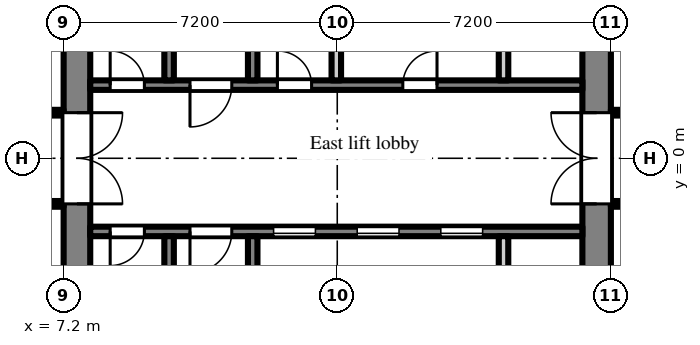
"""IFC4 building model, lengths in metres.
Left out: names, types, materials, properties, quantities, classifications, styles, units other than length and angle.
Written with IfcOpenShell. Run it as: python <this file> out.ifc"""

import sys

from ifc_helpers import new_model, si_unit, direction, frame, frame_2d, origin, place, context, subcontext, project, spatial, rectangle, extrude, element, fill, save


model = new_model("IFC4")
c1 = context("Model", 3, precision=1e-05, world=origin(), true_north=direction((0.0, 1.0)))
c2 = subcontext(c1, "Body", "Model", "MODEL_VIEW")
j1 = project(units=[si_unit("LENGTHUNIT", "METRE"), si_unit("PLANEANGLEUNIT", "RADIAN")], contexts=[c1])
p1 = place(None, origin())
s1 = spatial("IfcSite", under=j1, at=p1, CompositionType="ELEMENT")
p2 = place(p1, origin())
s2 = spatial("IfcBuilding", under=s1, at=p2, CompositionType="ELEMENT")
p3 = place(p2, frame((0.0, 0.0, 75.9)))
s3 = spatial("IfcBuildingStorey", under=s2, at=p3, CompositionType="ELEMENT", Elevation=75.9)
p4 = place(p3, frame((7.55, -7.2, 0.0), z_axis=(0.0, 0.0, 1.0), x_axis=(0.0, 1.0, 0.0)))
e1 = element("IfcWall", 1, at=p4, inside=s3, PredefinedType="SHEAR", context=c2, shape_type="SweptSolid", body=[
    extrude(rectangle(XDim=14.4, YDim=0.7, at=frame_2d((7.2, 0.0))), origin(), (0.0, 0.0, 1.0), 2.575),
])
p5 = place(p4, frame((6.0, 0.0, 0.0)))
e2 = element("IfcOpeningElement", 2, at=p5, cuts=e1, PredefinedType="OPENING", context=c2, shape_type="SweptSolid", body=[
    extrude(rectangle(XDim=2.4, YDim=2.2, at=frame_2d((1.2, 1.1))), frame((0.0, 0.36, 0.0), z_axis=(0.0, -1.0, 0.0), x_axis=(1.0, 0.0, 0.0)), (0.0, 0.0, 1.0), 0.72),
])
p6 = place(p3, frame((21.225, -7.2, 0.0), z_axis=(0.0, 0.0, 1.0), x_axis=(0.0, 1.0, 0.0)))
e3 = element("IfcWall", 3, at=p6, inside=s3, PredefinedType="SHEAR", context=c2, shape_type="SweptSolid", body=[
    extrude(rectangle(XDim=14.4, YDim=0.75, at=frame_2d((7.2, 0.0))), origin(), (0.0, 0.0, 1.0), 2.575),
])
p7 = place(p6, frame((6.0, 0.0, 0.0)))
e4 = element("IfcOpeningElement", 4, at=p7, cuts=e3, PredefinedType="OPENING", context=c2, shape_type="SweptSolid", body=[
    extrude(rectangle(XDim=2.4, YDim=2.2, at=frame_2d((1.2, 1.1))), frame((0.0, 0.385, 0.0), z_axis=(0.0, -1.0, 0.0), x_axis=(1.0, 0.0, 0.0)), (0.0, 0.0, 1.0), 0.77),
])
p8 = place(p3, frame((7.9, 1.925, 0.0), z_axis=(0.0, 0.0, 1.0), x_axis=(1.0, 0.0, 0.0)))
e5 = element("IfcWall", 5, at=p8, inside=s3, PredefinedType="SHEAR", context=c2, shape_type="SweptSolid", body=[
    extrude(rectangle(XDim=12.95, YDim=0.25, at=frame_2d((6.475, 0.0))), origin(), (0.0, 0.0, 1.0), 2.575),
])
p9 = place(p8, frame((0.525, 0.0, 0.0)))
e6 = element("IfcOpeningElement", 6, at=p9, cuts=e5, PredefinedType="OPENING", context=c2, shape_type="SweptSolid", body=[
    extrude(rectangle(XDim=0.9, YDim=2.1, at=frame_2d((0.45, 1.05))), frame((0.0, 0.135, 0.0), z_axis=(0.0, -1.0, 0.0), x_axis=(1.0, 0.0, 0.0)), (0.0, 0.0, 1.0), 0.27),
])
p10 = place(p8, frame((2.625, 0.0, 0.0)))
e7 = element("IfcOpeningElement", 7, at=p10, cuts=e5, PredefinedType="OPENING", context=c2, shape_type="SweptSolid", body=[
    extrude(rectangle(XDim=1.1, YDim=2.1, at=frame_2d((0.55, 1.05))), frame((0.0, 0.135, 0.0), z_axis=(0.0, -1.0, 0.0), x_axis=(1.0, 0.0, 0.0)), (0.0, 0.0, 1.0), 0.27),
])
p11 = place(p8, frame((4.925, 0.0, 0.0)))
e8 = element("IfcOpeningElement", 8, at=p11, cuts=e5, PredefinedType="OPENING", context=c2, shape_type="SweptSolid", body=[
    extrude(rectangle(XDim=0.9, YDim=2.1, at=frame_2d((0.45, 1.05))), frame((0.0, 0.135, 0.0), z_axis=(0.0, -1.0, 0.0), x_axis=(1.0, 0.0, 0.0)), (0.0, 0.0, 1.0), 0.27),
])
p12 = place(p8, frame((8.225, 0.0, 0.0)))
e9 = element("IfcOpeningElement", 9, at=p12, cuts=e5, PredefinedType="OPENING", context=c2, shape_type="SweptSolid", body=[
    extrude(rectangle(XDim=0.9, YDim=2.1, at=frame_2d((0.45, 1.05))), frame((0.0, 0.135, 0.0), z_axis=(0.0, -1.0, 0.0), x_axis=(1.0, 0.0, 0.0)), (0.0, 0.0, 1.0), 0.27),
])
p13 = place(p3, frame((9.975, 2.05, 0.0), z_axis=(0.0, 0.0, 1.0), x_axis=(0.0, 1.0, 0.0)))
e10 = element("IfcWall", 10, at=p13, inside=s3, PredefinedType="SHEAR", context=c2, shape_type="SweptSolid", body=[
    extrude(rectangle(XDim=4.65, YDim=0.25, at=frame_2d((2.325, 0.0))), origin(), (0.0, 0.0, 1.0), 2.575),
])
p14 = place(p13, frame((2.95, 0.0, 0.0)))
e11 = element("IfcOpeningElement", 11, at=p14, cuts=e10, PredefinedType="OPENING", context=c2, shape_type="SweptSolid", body=[
    extrude(rectangle(XDim=1.1, YDim=2.1, at=frame_2d((0.55, 1.05))), frame((0.0, 0.135, 0.0), z_axis=(0.0, -1.0, 0.0), x_axis=(1.0, 0.0, 0.0)), (0.0, 0.0, 1.0), 0.27),
])
p15 = place(p3, frame((12.175, 2.05, 0.0), z_axis=(0.0, 0.0, 1.0), x_axis=(0.0, 1.0, 0.0)))
e12 = element("IfcWall", 12, at=p15, inside=s3, PredefinedType="SHEAR", context=c2, shape_type="SweptSolid", body=[
    extrude(rectangle(XDim=4.65, YDim=0.25, at=frame_2d((2.325, 0.0))), origin(), (0.0, 0.0, 1.0), 2.575),
])
p16 = place(p15, frame((2.95, 0.0, 0.0)))
e13 = element("IfcOpeningElement", 13, at=p16, cuts=e12, PredefinedType="OPENING", context=c2, shape_type="SweptSolid", body=[
    extrude(rectangle(XDim=1.1, YDim=2.1, at=frame_2d((0.55, 1.05))), frame((0.0, 0.135, 0.0), z_axis=(0.0, -1.0, 0.0), x_axis=(1.0, 0.0, 0.0)), (0.0, 0.0, 1.0), 0.27),
])
for number, where, z_axis, x_axis in (
    (14, (14.375, 2.05, 0.0), (0.0, 0.0, 1.0), (0.0, 1.0, 0.0)),
    (15, (18.775, 2.05, 0.0), (0.0, 0.0, 1.0), (0.0, 1.0, 0.0)),
):
    element("IfcWall", number, at=place(p3, frame(where, z_axis=z_axis, x_axis=x_axis)), inside=s3, PredefinedType="PARTITIONING", context=c2, shape_type="SweptSolid", body=[
        extrude(rectangle(XDim=2.1, YDim=0.25, at=frame_2d((1.05, 0.0))), origin(), (0.0, 0.0, 1.0), 2.575),
    ])
p17 = place(p3, frame((7.9, -1.925, 0.0), z_axis=(0.0, 0.0, 1.0), x_axis=(1.0, 0.0, 0.0)))
e16 = element("IfcWall", 16, at=p17, inside=s3, PredefinedType="SHEAR", context=c2, shape_type="SweptSolid", body=[
    extrude(rectangle(XDim=12.95, YDim=0.25, at=frame_2d((6.475, 0.0))), origin(), (0.0, 0.0, 1.0), 2.575),
])
p18 = place(p17, frame((4.825, 0.0, 0.0)))
e17 = element("IfcOpeningElement", 17, at=p18, cuts=e16, PredefinedType="OPENING", context=c2, shape_type="SweptSolid", body=[
    extrude(rectangle(XDim=1.1, YDim=2.1, at=frame_2d((0.55, 1.05))), frame((0.0, 0.135, 0.0), z_axis=(0.0, -1.0, 0.0), x_axis=(1.0, 0.0, 0.0)), (0.0, 0.0, 1.0), 0.27),
])
p19 = place(p17, frame((7.025, 0.0, 0.0)))
e18 = element("IfcOpeningElement", 18, at=p19, cuts=e16, PredefinedType="OPENING", context=c2, shape_type="SweptSolid", body=[
    extrude(rectangle(XDim=1.1, YDim=2.1, at=frame_2d((0.55, 1.05))), frame((0.0, 0.135, 0.0), z_axis=(0.0, -1.0, 0.0), x_axis=(1.0, 0.0, 0.0)), (0.0, 0.0, 1.0), 0.27),
])
p20 = place(p17, frame((9.225, 0.0, 0.0)))
e19 = element("IfcOpeningElement", 19, at=p20, cuts=e16, PredefinedType="OPENING", context=c2, shape_type="SweptSolid", body=[
    extrude(rectangle(XDim=1.1, YDim=2.1, at=frame_2d((0.55, 1.05))), frame((0.0, 0.135, 0.0), z_axis=(0.0, -1.0, 0.0), x_axis=(1.0, 0.0, 0.0)), (0.0, 0.0, 1.0), 0.27),
])
p21 = place(p17, frame((0.525, 0.0, 0.0)))
e20 = element("IfcOpeningElement", 20, at=p21, cuts=e16, PredefinedType="OPENING", context=c2, shape_type="SweptSolid", body=[
    extrude(rectangle(XDim=0.9, YDim=2.1, at=frame_2d((0.45, 1.05))), frame((0.0, 0.135, 0.0), z_axis=(0.0, -1.0, 0.0), x_axis=(1.0, 0.0, 0.0)), (0.0, 0.0, 1.0), 0.27),
])
p22 = place(p17, frame((2.625, 0.0, 0.0)))
e21 = element("IfcOpeningElement", 21, at=p22, cuts=e16, PredefinedType="OPENING", context=c2, shape_type="SweptSolid", body=[
    extrude(rectangle(XDim=1.1, YDim=2.1, at=frame_2d((0.55, 1.05))), frame((0.0, 0.135, 0.0), z_axis=(0.0, -1.0, 0.0), x_axis=(1.0, 0.0, 0.0)), (0.0, 0.0, 1.0), 0.27),
])
p23 = place(p3, frame((9.975, -2.05, 0.0), z_axis=(0.0, 0.0, 1.0), x_axis=(0.0, -1.0, 0.0)))
e22 = element("IfcWall", 22, at=p23, inside=s3, PredefinedType="SHEAR", context=c2, shape_type="SweptSolid", body=[
    extrude(rectangle(XDim=4.65, YDim=0.25, at=frame_2d((2.325, 0.0))), origin(), (0.0, 0.0, 1.0), 2.575),
])
p24 = place(p23, frame((2.95, 0.0, 0.0)))
e23 = element("IfcOpeningElement", 23, at=p24, cuts=e22, PredefinedType="OPENING", context=c2, shape_type="SweptSolid", body=[
    extrude(rectangle(XDim=1.1, YDim=2.1, at=frame_2d((0.55, 1.05))), frame((0.0, 0.135, 0.0), z_axis=(0.0, -1.0, 0.0), x_axis=(1.0, 0.0, 0.0)), (0.0, 0.0, 1.0), 0.27),
])
p25 = place(p3, frame((12.175, -2.05, 0.0), z_axis=(0.0, 0.0, 1.0), x_axis=(0.0, -1.0, 0.0)))
e24 = element("IfcWall", 24, at=p25, inside=s3, PredefinedType="SHEAR", context=c2, shape_type="SweptSolid", body=[
    extrude(rectangle(XDim=4.65, YDim=0.25, at=frame_2d((2.325, 0.0))), origin(), (0.0, 0.0, 1.0), 2.575),
])
p26 = place(p25, frame((2.95, 0.0, 0.0)))
e25 = element("IfcOpeningElement", 25, at=p26, cuts=e24, PredefinedType="OPENING", context=c2, shape_type="SweptSolid", body=[
    extrude(rectangle(XDim=1.1, YDim=2.1, at=frame_2d((0.55, 1.05))), frame((0.0, 0.135, 0.0), z_axis=(0.0, -1.0, 0.0), x_axis=(1.0, 0.0, 0.0)), (0.0, 0.0, 1.0), 0.27),
])
p27 = place(p3, frame((18.775, -2.05, 0.0), z_axis=(0.0, 0.0, 1.0), x_axis=(0.0, -1.0, 0.0)))
e26 = element("IfcWall", 26, at=p27, inside=s3, PredefinedType="PARTITIONING", context=c2, shape_type="SweptSolid", body=[
    extrude(rectangle(XDim=2.1, YDim=0.25, at=frame_2d((1.05, 0.0))), origin(), (0.0, 0.0, 1.0), 2.575),
])
p28 = place(p3, frame((1.275, -1.2, 0.0), z_axis=(0.0, 0.0, 1.0), x_axis=(1.0, 0.0, 0.0)))
e27 = element("IfcWall", 27, at=p28, inside=s3, PredefinedType="PARTITIONING", context=c2, shape_type="SweptSolid", body=[
    extrude(rectangle(XDim=5.925, YDim=0.15, at=frame_2d((2.962, 0.0))), origin(), (0.0, 0.0, 1.0), 2.575),
])
p29 = place(p28, frame((3.075, 0.0, 0.0)))
e28 = element("IfcOpeningElement", 28, at=p29, cuts=e27, PredefinedType="OPENING", context=c2, shape_type="SweptSolid", body=[
    extrude(rectangle(XDim=0.9, YDim=2.1, at=frame_2d((0.45, 1.05))), frame((0.0, 0.085, 0.0), z_axis=(0.0, -1.0, 0.0), x_axis=(1.0, 0.0, 0.0)), (0.0, 0.0, 1.0), 0.17),
])
p30 = place(p3, frame((1.275, 1.2, 0.0), z_axis=(0.0, 0.0, 1.0), x_axis=(1.0, 0.0, 0.0)))
e29 = element("IfcWall", 29, at=p30, inside=s3, PredefinedType="PARTITIONING", context=c2, shape_type="SweptSolid", body=[
    extrude(rectangle(XDim=5.925, YDim=0.15, at=frame_2d((2.962, 0.0))), origin(), (0.0, 0.0, 1.0), 2.575),
])
p31 = place(p30, frame((3.475, 0.0, 0.0)))
e30 = element("IfcOpeningElement", 30, at=p31, cuts=e29, PredefinedType="OPENING", context=c2, shape_type="SweptSolid", body=[
    extrude(rectangle(XDim=0.9, YDim=2.1, at=frame_2d((0.45, 1.05))), frame((0.0, 0.085, 0.0), z_axis=(0.0, -1.0, 0.0), x_axis=(1.0, 0.0, 0.0)), (0.0, 0.0, 1.0), 0.17),
])
p32 = place(p3, frame((21.6, -1.2, 0.0), z_axis=(0.0, 0.0, 1.0), x_axis=(1.0, 0.0, 0.0)))
e31 = element("IfcWall", 31, at=p32, inside=s3, PredefinedType="PARTITIONING", context=c2, shape_type="SweptSolid", body=[
    extrude(rectangle(XDim=14.9, YDim=0.15, at=frame_2d((7.45, 0.0))), origin(), (0.0, 0.0, 1.0), 2.575),
])
p33 = place(p32, frame((0.45, 0.0, 0.0)))
e32 = element("IfcOpeningElement", 32, at=p33, cuts=e31, PredefinedType="OPENING", context=c2, shape_type="SweptSolid", body=[
    extrude(rectangle(XDim=0.9, YDim=2.1, at=frame_2d((0.45, 1.05))), frame((0.0, 0.085, 0.0), z_axis=(0.0, -1.0, 0.0), x_axis=(1.0, 0.0, 0.0)), (0.0, 0.0, 1.0), 0.17),
])
p34 = place(p32, frame((2.25, 0.0, 0.0)))
e33 = element("IfcOpeningElement", 33, at=p34, cuts=e31, PredefinedType="OPENING", context=c2, shape_type="SweptSolid", body=[
    extrude(rectangle(XDim=0.9, YDim=2.1, at=frame_2d((0.45, 1.05))), frame((0.0, 0.085, 0.0), z_axis=(0.0, -1.0, 0.0), x_axis=(1.0, 0.0, 0.0)), (0.0, 0.0, 1.0), 0.17),
])
p35 = place(p32, frame((4.95, 0.0, 0.0)))
e34 = element("IfcOpeningElement", 34, at=p35, cuts=e31, PredefinedType="OPENING", context=c2, shape_type="SweptSolid", body=[
    extrude(rectangle(XDim=0.9, YDim=2.1, at=frame_2d((0.45, 1.05))), frame((0.0, 0.085, 0.0), z_axis=(0.0, -1.0, 0.0), x_axis=(1.0, 0.0, 0.0)), (0.0, 0.0, 1.0), 0.17),
])
p36 = place(p32, frame((7.65, 0.0, 0.0)))
e35 = element("IfcOpeningElement", 35, at=p36, cuts=e31, PredefinedType="OPENING", context=c2, shape_type="SweptSolid", body=[
    extrude(rectangle(XDim=0.9, YDim=2.1, at=frame_2d((0.45, 1.05))), frame((0.0, 0.085, 0.0), z_axis=(0.0, -1.0, 0.0), x_axis=(1.0, 0.0, 0.0)), (0.0, 0.0, 1.0), 0.17),
])
p37 = place(p32, frame((9.45, 0.0, 0.0)))
e36 = element("IfcOpeningElement", 36, at=p37, cuts=e31, PredefinedType="OPENING", context=c2, shape_type="SweptSolid", body=[
    extrude(rectangle(XDim=0.9, YDim=2.1, at=frame_2d((0.45, 1.05))), frame((0.0, 0.085, 0.0), z_axis=(0.0, -1.0, 0.0), x_axis=(1.0, 0.0, 0.0)), (0.0, 0.0, 1.0), 0.17),
])
p38 = place(p32, frame((11.95, 0.0, 0.0)))
e37 = element("IfcOpeningElement", 37, at=p38, cuts=e31, PredefinedType="OPENING", context=c2, shape_type="SweptSolid", body=[
    extrude(rectangle(XDim=1.8, YDim=2.1, at=frame_2d((0.9, 1.05))), frame((0.0, 0.085, 0.0), z_axis=(0.0, -1.0, 0.0), x_axis=(1.0, 0.0, 0.0)), (0.0, 0.0, 1.0), 0.17),
])
p39 = place(p3, frame((21.6, 1.2, 0.0), z_axis=(0.0, 0.0, 1.0), x_axis=(1.0, 0.0, 0.0)))
e38 = element("IfcWall", 38, at=p39, inside=s3, PredefinedType="PARTITIONING", context=c2, shape_type="SweptSolid", body=[
    extrude(rectangle(XDim=14.9, YDim=0.15, at=frame_2d((7.45, 0.0))), origin(), (0.0, 0.0, 1.0), 2.575),
])
p40 = place(p39, frame((0.45, 0.0, 0.0)))
e39 = element("IfcOpeningElement", 39, at=p40, cuts=e38, PredefinedType="OPENING", context=c2, shape_type="SweptSolid", body=[
    extrude(rectangle(XDim=0.9, YDim=2.1, at=frame_2d((0.45, 1.05))), frame((0.0, 0.085, 0.0), z_axis=(0.0, -1.0, 0.0), x_axis=(1.0, 0.0, 0.0)), (0.0, 0.0, 1.0), 0.17),
])
p41 = place(p39, frame((2.25, 0.0, 0.0)))
e40 = element("IfcOpeningElement", 40, at=p41, cuts=e38, PredefinedType="OPENING", context=c2, shape_type="SweptSolid", body=[
    extrude(rectangle(XDim=0.9, YDim=2.1, at=frame_2d((0.45, 1.05))), frame((0.0, 0.085, 0.0), z_axis=(0.0, -1.0, 0.0), x_axis=(1.0, 0.0, 0.0)), (0.0, 0.0, 1.0), 0.17),
])
p42 = place(p39, frame((6.0, 0.0, 0.0)))
e41 = element("IfcOpeningElement", 41, at=p42, cuts=e38, PredefinedType="OPENING", context=c2, shape_type="SweptSolid", body=[
    extrude(rectangle(XDim=1.0, YDim=2.1, at=frame_2d((0.5, 1.05))), frame((0.0, 0.085, 0.0), z_axis=(0.0, -1.0, 0.0), x_axis=(1.0, 0.0, 0.0)), (0.0, 0.0, 1.0), 0.17),
])
p43 = place(p39, frame((8.55, 0.0, 0.0)))
e42 = element("IfcOpeningElement", 42, at=p43, cuts=e38, PredefinedType="OPENING", context=c2, shape_type="SweptSolid", body=[
    extrude(rectangle(XDim=0.9, YDim=2.1, at=frame_2d((0.45, 1.05))), frame((0.0, 0.085, 0.0), z_axis=(0.0, -1.0, 0.0), x_axis=(1.0, 0.0, 0.0)), (0.0, 0.0, 1.0), 0.17),
])
p44 = place(p39, frame((11.95, 0.0, 0.0)))
e43 = element("IfcOpeningElement", 43, at=p44, cuts=e38, PredefinedType="OPENING", context=c2, shape_type="SweptSolid", body=[
    extrude(rectangle(XDim=1.8, YDim=2.1, at=frame_2d((0.9, 1.05))), frame((0.0, 0.085, 0.0), z_axis=(0.0, -1.0, 0.0), x_axis=(1.0, 0.0, 0.0)), (0.0, 0.0, 1.0), 0.17),
])
p45 = place(p18, origin())
e44 = element("IfcDoor", 44, at=p45, inside=s3, OperationType="SLIDING_TO_LEFT", PredefinedType="DOOR", context=c2, shape_type="SweptSolid", body=[
    extrude(rectangle(XDim=1.1, YDim=2.1, at=frame_2d((0.55, 1.05))), frame((0.0, 0.025, 0.0), z_axis=(0.0, -1.0, 0.0), x_axis=(1.0, 0.0, 0.0)), (0.0, 0.0, 1.0), 0.05),
])
fill(e17, e44)
p46 = place(p19, origin())
e45 = element("IfcDoor", 45, at=p46, inside=s3, OperationType="SLIDING_TO_LEFT", PredefinedType="DOOR", context=c2, shape_type="SweptSolid", body=[
    extrude(rectangle(XDim=1.1, YDim=2.1, at=frame_2d((0.55, 1.05))), frame((0.0, 0.025, 0.0), z_axis=(0.0, -1.0, 0.0), x_axis=(1.0, 0.0, 0.0)), (0.0, 0.0, 1.0), 0.05),
])
fill(e18, e45)
p47 = place(p20, origin())
e46 = element("IfcDoor", 46, at=p47, inside=s3, OperationType="SLIDING_TO_LEFT", PredefinedType="DOOR", context=c2, shape_type="SweptSolid", body=[
    extrude(rectangle(XDim=1.1, YDim=2.1, at=frame_2d((0.55, 1.05))), frame((0.0, 0.025, 0.0), z_axis=(0.0, -1.0, 0.0), x_axis=(1.0, 0.0, 0.0)), (0.0, 0.0, 1.0), 0.05),
])
fill(e19, e46)
p48 = place(p9, origin())
e47 = element("IfcDoor", 47, at=p48, inside=s3, OperationType="SINGLE_SWING_LEFT", PredefinedType="DOOR", context=c2, shape_type="SweptSolid", body=[
    extrude(rectangle(XDim=0.9, YDim=2.1, at=frame_2d((0.45, 1.05))), frame((0.0, 0.025, 0.0), z_axis=(0.0, -1.0, 0.0), x_axis=(1.0, 0.0, 0.0)), (0.0, 0.0, 1.0), 0.05),
])
fill(e6, e47)
p49 = place(p21, frame((0.9, 0.0, 0.0), z_axis=(0.0, 0.0, 1.0), x_axis=(-1.0, 0.0, 0.0)))
e48 = element("IfcDoor", 48, at=p49, inside=s3, OperationType="SINGLE_SWING_RIGHT", PredefinedType="DOOR", context=c2, shape_type="SweptSolid", body=[
    extrude(rectangle(XDim=0.9, YDim=2.1, at=frame_2d((0.45, 1.05))), frame((0.0, 0.025, 0.0), z_axis=(0.0, -1.0, 0.0), x_axis=(1.0, 0.0, 0.0)), (0.0, 0.0, 1.0), 0.05),
])
fill(e20, e48)
p50 = place(p10, frame((1.1, 0.0, 0.0), z_axis=(0.0, 0.0, 1.0), x_axis=(-1.0, 0.0, 0.0)))
e49 = element("IfcDoor", 49, at=p50, inside=s3, OperationType="SINGLE_SWING_RIGHT", PredefinedType="DOOR", context=c2, shape_type="SweptSolid", body=[
    extrude(rectangle(XDim=1.1, YDim=2.1, at=frame_2d((0.55, 1.05))), frame((0.0, 0.025, 0.0), z_axis=(0.0, -1.0, 0.0), x_axis=(1.0, 0.0, 0.0)), (0.0, 0.0, 1.0), 0.05),
])
fill(e7, e49)
p51 = place(p22, frame((1.1, 0.0, 0.0), z_axis=(0.0, 0.0, 1.0), x_axis=(-1.0, 0.0, 0.0)))
e50 = element("IfcDoor", 50, at=p51, inside=s3, OperationType="SINGLE_SWING_RIGHT", PredefinedType="DOOR", context=c2, shape_type="SweptSolid", body=[
    extrude(rectangle(XDim=1.1, YDim=2.1, at=frame_2d((0.55, 1.05))), frame((0.0, 0.025, 0.0), z_axis=(0.0, -1.0, 0.0), x_axis=(1.0, 0.0, 0.0)), (0.0, 0.0, 1.0), 0.05),
])
fill(e21, e50)
p52 = place(p5, frame((2.4, 0.0, 0.0), z_axis=(0.0, 0.0, 1.0), x_axis=(-1.0, 0.0, 0.0)))
e51 = element("IfcDoor", 51, at=p52, inside=s3, OperationType="DOUBLE_DOOR_DOUBLE_SWING", PredefinedType="DOOR", context=c2, shape_type="SweptSolid", body=[
    extrude(rectangle(XDim=2.4, YDim=2.2, at=frame_2d((1.2, 1.1))), frame((0.0, 0.025, 0.0), z_axis=(0.0, -1.0, 0.0), x_axis=(1.0, 0.0, 0.0)), (0.0, 0.0, 1.0), 0.05),
])
fill(e2, e51)
p53 = place(p7, origin())
e52 = element("IfcDoor", 52, at=p53, inside=s3, OperationType="DOUBLE_DOOR_DOUBLE_SWING", PredefinedType="DOOR", context=c2, shape_type="SweptSolid", body=[
    extrude(rectangle(XDim=2.4, YDim=2.2, at=frame_2d((1.2, 1.1))), frame((0.0, 0.025, 0.0), z_axis=(0.0, -1.0, 0.0), x_axis=(1.0, 0.0, 0.0)), (0.0, 0.0, 1.0), 0.05),
])
fill(e4, e52)
p54 = place(p11, origin())
e53 = element("IfcDoor", 53, at=p54, inside=s3, OperationType="SINGLE_SWING_LEFT", PredefinedType="DOOR", context=c2, shape_type="SweptSolid", body=[
    extrude(rectangle(XDim=0.9, YDim=2.1, at=frame_2d((0.45, 1.05))), frame((0.0, 0.025, 0.0), z_axis=(0.0, -1.0, 0.0), x_axis=(1.0, 0.0, 0.0)), (0.0, 0.0, 1.0), 0.05),
])
fill(e8, e53)
p55 = place(p12, origin())
e54 = element("IfcDoor", 54, at=p55, inside=s3, OperationType="SINGLE_SWING_RIGHT", PredefinedType="DOOR", context=c2, shape_type="SweptSolid", body=[
    extrude(rectangle(XDim=0.9, YDim=2.1, at=frame_2d((0.45, 1.05))), frame((0.0, 0.025, 0.0), z_axis=(0.0, -1.0, 0.0), x_axis=(1.0, 0.0, 0.0)), (0.0, 0.0, 1.0), 0.05),
])
fill(e9, e54)
save(model, sys.argv[1])
